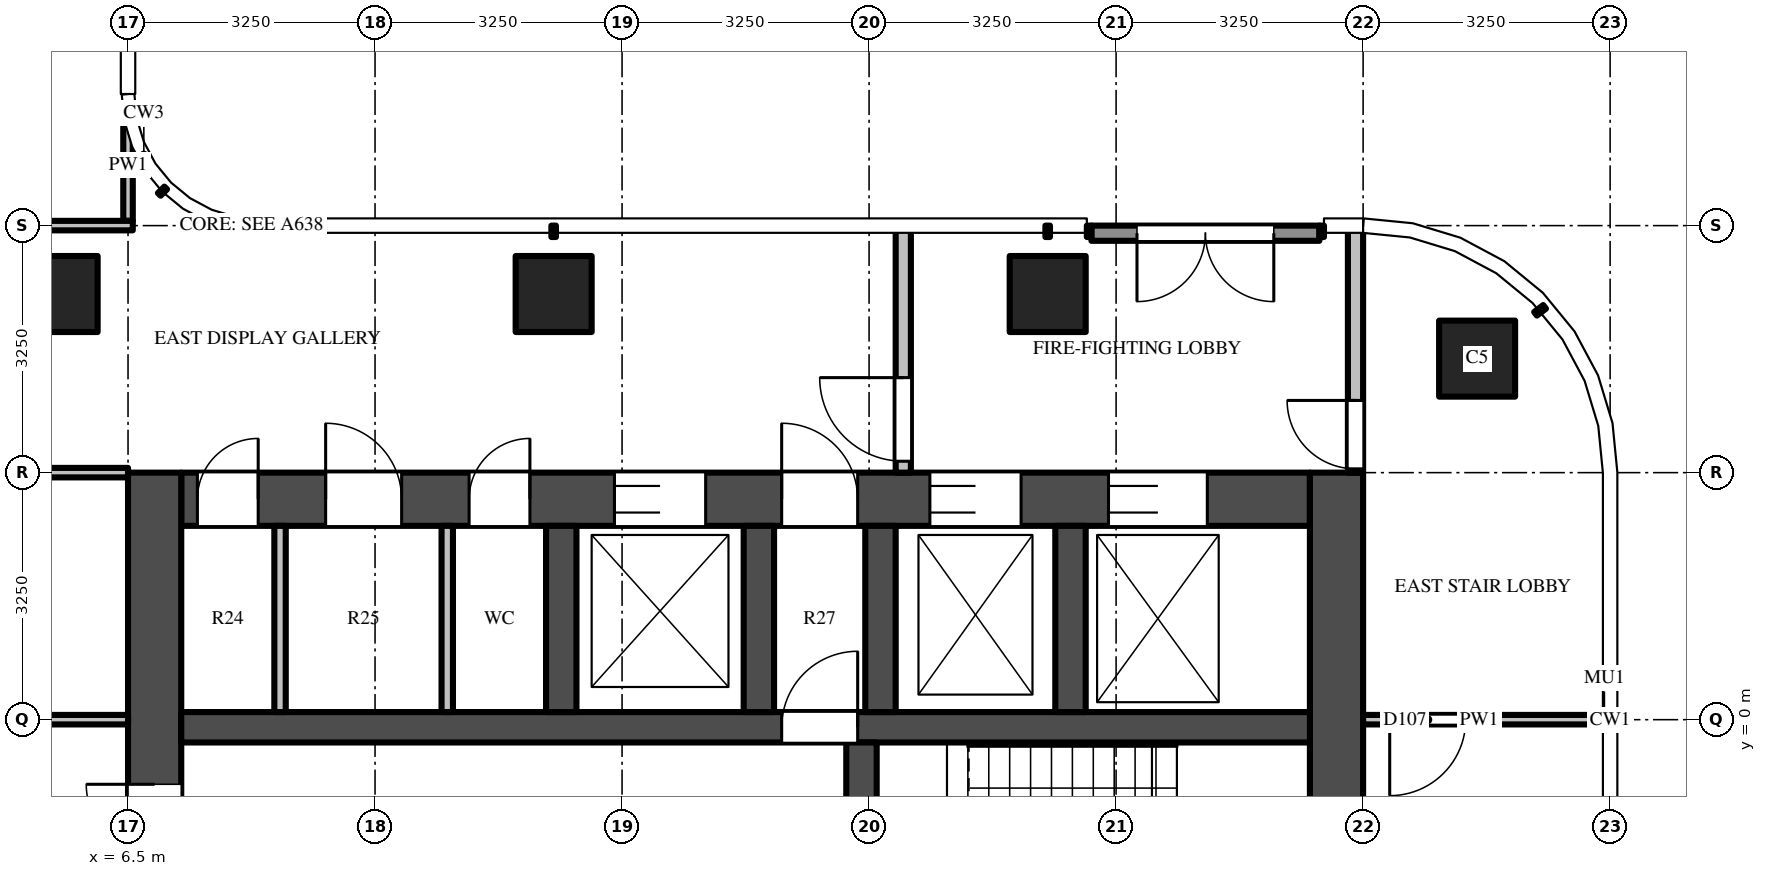
"""IFC4 building model, lengths in metres.
Left out: names, types, materials, properties, quantities, classifications, styles, units other than length and angle.
Written with IfcOpenShell. Run it as: python <this file> out.ifc"""

import sys

from ifc_helpers import new_model, si_unit, direction, frame, frame_2d, origin, origin_2d, place, context, subcontext, project, spatial, rectangle, extrude, source, transform, mapped, element, fill, save


model = new_model("IFC4")
c1 = context("Model", 3, precision=1e-05, world=origin(), true_north=direction((0.0, 1.0)))
c2 = subcontext(c1, "Body", "Model", "MODEL_VIEW")
j1 = project(units=[si_unit("LENGTHUNIT", "METRE"), si_unit("PLANEANGLEUNIT", "RADIAN")], contexts=[c1])
p1 = place(None, origin())
s1 = spatial("IfcSite", under=j1, at=p1, CompositionType="ELEMENT")
p2 = place(p1, origin())
s2 = spatial("IfcBuilding", under=s1, at=p2, CompositionType="ELEMENT")
p3 = place(p2, frame((0.0, 0.0, 295.0)))
s3 = spatial("IfcBuildingStorey", under=s2, at=p3, CompositionType="ELEMENT", Elevation=295.0)
m1 = source(origin(), c2, "Body", "SweptSolid", [
    extrude(rectangle(XDim=1.0, YDim=1.0, at=origin_2d()), origin(), (0.0, 0.0, 1.0), 3.9),
])
for number, where, z_axis, x_axis in (
    (1, (12.1, 5.6, 0.0), (0.0, 0.0, 1.0), (1.0, 0.0, 0.0)),
    (2, (18.6, 5.6, 0.0), (0.0, 0.0, 1.0), (1.0, 0.0, 0.0)),
    (3, (24.25, 4.75, 0.0), (0.0, 0.0, 1.0), (1.0, 0.0, 0.0)),
    (4, (5.6, 5.6, 0.0), (0.0, 0.0, 1.0), (1.0, 0.0, 0.0)),
):
    element("IfcColumn", number, at=place(p3, frame(where, z_axis=z_axis, x_axis=x_axis)), inside=s3, PredefinedType="COLUMN", context=c2, shape_type="MappedRepresentation", body=[
        mapped(m1, transform((0.0, 0.0, 0.0))),
    ])
m2 = source(origin(), c2, "Body", "SweptSolid", [
    extrude(rectangle(XDim=14.85, YDim=0.7, at=frame_2d((7.425, 0.0))), origin(), (0.0, 0.0, 1.0), 3.7),
])
p4 = place(p3, frame((7.2, 2.9, 0.0), z_axis=(0.0, 0.0, 1.0), x_axis=(1.0, 0.0, 0.0)))
e5 = element("IfcWall", 5, at=p4, inside=s3, PredefinedType="SHEAR", context=c2, shape_type="MappedRepresentation", body=[
    mapped(m2, transform((0.0, 0.0, 0.0))),
])
m3 = source(origin(), c2, "Body", "SweptSolid", [
    extrude(rectangle(XDim=1.2, YDim=2.1, at=frame_2d((0.6, 1.05))), frame((0.0, 0.36, 0.0), z_axis=(0.0, -1.0, 0.0), x_axis=(1.0, 0.0, 0.0)), (0.0, 0.0, 1.0), 0.72),
])
p5 = place(p4, frame((5.7, 0.0, 0.0)))
e6 = element("IfcOpeningElement", 6, at=p5, cuts=e5, PredefinedType="OPENING", context=c2, shape_type="MappedRepresentation", body=[
    mapped(m3, transform((0.0, 0.0, 0.0))),
])
m4 = source(origin(), c2, "Body", "SweptSolid", [
    extrude(rectangle(XDim=1.3, YDim=2.1, at=frame_2d((0.65, 1.05))), frame((0.0, 0.36, 0.0), z_axis=(0.0, -1.0, 0.0), x_axis=(1.0, 0.0, 0.0)), (0.0, 0.0, 1.0), 0.72),
])
p6 = place(p4, frame((12.2, 0.0, 0.0)))
e7 = element("IfcOpeningElement", 7, at=p6, cuts=e5, PredefinedType="OPENING", context=c2, shape_type="MappedRepresentation", body=[
    mapped(m4, transform((0.0, 0.0, 0.0))),
])
p7 = place(p4, frame((9.85, 0.0, 0.0)))
e8 = element("IfcOpeningElement", 8, at=p7, cuts=e5, PredefinedType="OPENING", context=c2, shape_type="MappedRepresentation", body=[
    mapped(m3, transform((0.0, 0.0, 0.0))),
])
m5 = source(origin(), c2, "Body", "SweptSolid", [
    extrude(rectangle(XDim=1.0, YDim=2.1, at=frame_2d((0.5, 1.05))), frame((0.0, 0.36, 0.0), z_axis=(0.0, -1.0, 0.0), x_axis=(1.0, 0.0, 0.0)), (0.0, 0.0, 1.0), 0.72),
])
p8 = place(p4, frame((7.9, 0.0, 0.0)))
e9 = element("IfcOpeningElement", 9, at=p8, cuts=e5, PredefinedType="OPENING", context=c2, shape_type="MappedRepresentation", body=[
    mapped(m5, transform((0.0, 0.0, 0.0))),
])
m6 = source(origin(), c2, "Body", "SweptSolid", [
    extrude(rectangle(XDim=0.8, YDim=2.1, at=frame_2d((0.4, 1.05))), frame((0.0, 0.36, 0.0), z_axis=(0.0, -1.0, 0.0), x_axis=(1.0, 0.0, 0.0)), (0.0, 0.0, 1.0), 0.72),
])
p9 = place(p4, frame((0.212, 0.0, 0.0)))
e10 = element("IfcOpeningElement", 10, at=p9, cuts=e5, PredefinedType="OPENING", context=c2, shape_type="MappedRepresentation", body=[
    mapped(m6, transform((0.0, 0.0, 0.0))),
])
p10 = place(p4, frame((1.9, 0.0, 0.0)))
e11 = element("IfcOpeningElement", 11, at=p10, cuts=e5, PredefinedType="OPENING", context=c2, shape_type="MappedRepresentation", body=[
    mapped(m5, transform((0.0, 0.0, 0.0))),
])
p11 = place(p4, frame((3.788, 0.0, 0.0)))
e12 = element("IfcOpeningElement", 12, at=p11, cuts=e5, PredefinedType="OPENING", context=c2, shape_type="MappedRepresentation", body=[
    mapped(m6, transform((0.0, 0.0, 0.0))),
])
m7 = source(origin(), c2, "Body", "SweptSolid", [
    extrude(rectangle(XDim=9.05, YDim=0.7, at=frame_2d((4.525, 0.0))), origin(), (0.0, 0.0, 1.0), 3.7),
])
p12 = place(p3, frame((6.85, -5.8, 0.0), z_axis=(0.0, 0.0, 1.0), x_axis=(0.0, 1.0, 0.0)))
e13 = element("IfcWall", 13, at=p12, inside=s3, PredefinedType="SHEAR", context=c2, shape_type="MappedRepresentation", body=[
    mapped(m7, transform((0.0, 0.0, 0.0))),
])
m8 = source(origin(), c2, "Body", "SweptSolid", [
    extrude(rectangle(XDim=1.8, YDim=2.1, at=frame_2d((0.9, 1.05))), frame((0.0, 0.36, 0.0), z_axis=(0.0, -1.0, 0.0), x_axis=(1.0, 0.0, 0.0)), (0.0, 0.0, 1.0), 0.72),
])
p13 = place(p12, frame((3.15, 0.0, 0.0)))
e14 = element("IfcOpeningElement", 14, at=p13, cuts=e13, PredefinedType="OPENING", context=c2, shape_type="MappedRepresentation", body=[
    mapped(m8, transform((0.0, 0.0, 0.0))),
])
p14 = place(p3, frame((22.4, -5.8, 0.0), z_axis=(0.0, 0.0, 1.0), x_axis=(0.0, 1.0, 0.0)))
e15 = element("IfcWall", 15, at=p14, inside=s3, PredefinedType="SHEAR", context=c2, shape_type="MappedRepresentation", body=[
    mapped(m7, transform((0.0, 0.0, 0.0))),
])
m9 = source(origin(), c2, "Body", "SweptSolid", [
    extrude(rectangle(XDim=14.85, YDim=0.4, at=frame_2d((7.425, 0.0))), origin(), (0.0, 0.0, 1.0), 3.7),
])
p15 = place(p3, frame((7.2, -0.1, 0.0), z_axis=(0.0, 0.0, 1.0), x_axis=(1.0, 0.0, 0.0)))
e16 = element("IfcWall", 16, at=p15, inside=s3, PredefinedType="SHEAR", context=c2, shape_type="MappedRepresentation", body=[
    mapped(m9, transform((0.0, 0.0, 0.0))),
])
m10 = source(origin(), c2, "Body", "SweptSolid", [
    extrude(rectangle(XDim=1.0, YDim=2.1, at=frame_2d((0.5, 1.05))), frame((0.0, 0.21, 0.0), z_axis=(0.0, -1.0, 0.0), x_axis=(1.0, 0.0, 0.0)), (0.0, 0.0, 1.0), 0.42),
])
p16 = place(p15, frame((7.9, 0.0, 0.0)))
e17 = element("IfcOpeningElement", 17, at=p16, cuts=e16, PredefinedType="OPENING", context=c2, shape_type="MappedRepresentation", body=[
    mapped(m10, transform((0.0, 0.0, 0.0))),
])
m11 = source(origin(), c2, "Body", "SweptSolid", [
    extrude(rectangle(XDim=5.5, YDim=0.4, at=frame_2d((2.75, 0.0))), origin(), (0.0, 0.0, 1.0), 3.7),
])
p17 = place(p3, frame((16.15, -5.8, 0.0), z_axis=(0.0, 0.0, 1.0), x_axis=(0.0, 1.0, 0.0)))
e18 = element("IfcWall", 18, at=p17, inside=s3, PredefinedType="SHEAR", context=c2, shape_type="MappedRepresentation", body=[
    mapped(m11, transform((0.0, 0.0, 0.0))),
])
m12 = source(origin(), c2, "Body", "SweptSolid", [
    extrude(rectangle(XDim=1.1, YDim=2.1, at=frame_2d((0.55, 1.05))), frame((0.0, 0.21, 0.0), z_axis=(0.0, -1.0, 0.0), x_axis=(1.0, 0.0, 0.0)), (0.0, 0.0, 1.0), 0.42),
])
p18 = place(p17, frame((0.725, 0.0, 0.0)))
e19 = element("IfcOpeningElement", 19, at=p18, cuts=e18, PredefinedType="OPENING", context=c2, shape_type="MappedRepresentation", body=[
    mapped(m12, transform((0.0, 0.0, 0.0))),
])
p19 = place(p17, frame((3.675, 0.0, 0.0)))
e20 = element("IfcOpeningElement", 20, at=p19, cuts=e18, PredefinedType="OPENING", context=c2, shape_type="MappedRepresentation", body=[
    mapped(m12, transform((0.0, 0.0, 0.0))),
])
m13 = source(origin(), c2, "Body", "SweptSolid", [
    extrude(rectangle(XDim=2.45, YDim=0.4, at=frame_2d((1.225, 0.0))), origin(), (0.0, 0.0, 1.0), 3.7),
])
for number, where, z_axis, x_axis in (
    (21, (12.2, 0.1, 0.0), (0.0, 0.0, 1.0), (0.0, 1.0, 0.0)),
    (22, (14.8, 0.1, 0.0), (0.0, 0.0, 1.0), (0.0, 1.0, 0.0)),
    (23, (16.4, 0.1, 0.0), (0.0, 0.0, 1.0), (0.0, 1.0, 0.0)),
    (24, (18.9, 0.1, 0.0), (0.0, 0.0, 1.0), (0.0, 1.0, 0.0)),
):
    element("IfcWall", number, at=place(p3, frame(where, z_axis=z_axis, x_axis=x_axis)), inside=s3, PredefinedType="SHEAR", context=c2, shape_type="MappedRepresentation", body=[
        mapped(m13, transform((0.0, 0.0, 0.0))),
    ])
m14 = source(origin(), c2, "Body", "SweptSolid", [
    extrude(rectangle(XDim=3.25, YDim=0.2, at=frame_2d((1.625, 0.0))), origin(), (0.0, 0.0, 1.0), 3.7),
])
p20 = place(p3, frame((16.7, 3.25, 0.0), z_axis=(0.0, 0.0, 1.0), x_axis=(0.0, 1.0, 0.0)))
e25 = element("IfcWall", 25, at=p20, inside=s3, PredefinedType="PARTITIONING", context=c2, shape_type="MappedRepresentation", body=[
    mapped(m14, transform((0.0, 0.0, 0.0))),
])
m15 = source(origin(), c2, "Body", "SweptSolid", [
    extrude(rectangle(XDim=1.1, YDim=2.1, at=frame_2d((0.55, 1.05))), frame((0.0, 0.11, 0.0), z_axis=(0.0, -1.0, 0.0), x_axis=(1.0, 0.0, 0.0)), (0.0, 0.0, 1.0), 0.22),
])
p21 = place(p20, frame((0.15, 0.0, 0.0)))
e26 = element("IfcOpeningElement", 26, at=p21, cuts=e25, PredefinedType="OPENING", context=c2, shape_type="MappedRepresentation", body=[
    mapped(m15, transform((0.0, 0.0, 0.0))),
])
p22 = place(p3, frame((22.65, 3.25, 0.0), z_axis=(0.0, 0.0, 1.0), x_axis=(0.0, 1.0, 0.0)))
e27 = element("IfcWall", 27, at=p22, inside=s3, PredefinedType="PARTITIONING", context=c2, shape_type="MappedRepresentation", body=[
    mapped(m14, transform((0.0, 0.0, 0.0))),
])
m16 = source(origin(), c2, "Body", "SweptSolid", [
    extrude(rectangle(XDim=0.9, YDim=2.1, at=frame_2d((0.45, 1.05))), frame((0.0, 0.11, 0.0), z_axis=(0.0, -1.0, 0.0), x_axis=(1.0, 0.0, 0.0)), (0.0, 0.0, 1.0), 0.22),
])
p23 = place(p22, frame((0.05, 0.0, 0.0)))
e28 = element("IfcOpeningElement", 28, at=p23, cuts=e27, PredefinedType="OPENING", context=c2, shape_type="MappedRepresentation", body=[
    mapped(m16, transform((0.0, 0.0, 0.0))),
])
m17 = source(origin(), c2, "Body", "SweptSolid", [
    extrude(rectangle(XDim=2.45, YDim=0.15, at=frame_2d((1.225, 0.0))), origin(), (0.0, 0.0, 1.0), 3.7),
])
for number, where, z_axis, x_axis in (
    (29, (8.5, 0.1, 0.0), (0.0, 0.0, 1.0), (0.0, 1.0, 0.0)),
    (30, (10.7, 0.1, 0.0), (0.0, 0.0, 1.0), (0.0, 1.0, 0.0)),
):
    element("IfcWall", number, at=place(p3, frame(where, z_axis=z_axis, x_axis=x_axis)), inside=s3, PredefinedType="PARTITIONING", context=c2, shape_type="MappedRepresentation", body=[
        mapped(m17, transform((0.0, 0.0, 0.0))),
    ])
m18 = source(origin(), c2, "Body", "SweptSolid", [
    extrude(rectangle(XDim=3.0, YDim=0.2, at=frame_2d((1.5, 0.0))), origin(), (0.0, 0.0, 1.0), 3.7),
])
p24 = place(p3, frame((22.175, 6.4, 0.0), z_axis=(0.0, 0.0, 1.0), x_axis=(-1.0, 0.0, 0.0)))
e31 = element("IfcWall", 31, at=p24, inside=s3, PredefinedType="SOLIDWALL", context=c2, shape_type="MappedRepresentation", body=[
    mapped(m18, transform((0.0, 0.0, 0.0))),
])
m19 = source(origin(), c2, "Body", "SweptSolid", [
    extrude(rectangle(XDim=1.8, YDim=2.4, at=frame_2d((0.9, 1.2))), frame((0.0, 0.11, 0.0), z_axis=(0.0, -1.0, 0.0), x_axis=(1.0, 0.0, 0.0)), (0.0, 0.0, 1.0), 0.22),
])
p25 = place(p24, frame((0.6, 0.0, 0.0)))
e32 = element("IfcOpeningElement", 32, at=p25, cuts=e31, PredefinedType="OPENING", context=c2, shape_type="MappedRepresentation", body=[
    mapped(m19, transform((0.0, 0.0, 0.0))),
])
m20 = source(origin(), c2, "Body", "SweptSolid", [
    extrude(rectangle(XDim=1.469, YDim=0.125, at=frame_2d((0.734, 0.0))), origin(), (0.0, 0.0, 1.0), 3.7),
])
p26 = place(p3, frame((6.5, 6.562, 0.0), z_axis=(0.0, 0.0, 1.0), x_axis=(0.0, 1.0, 0.0)))
e33 = element("IfcWall", 33, at=p26, inside=s3, PredefinedType="PARTITIONING", context=c2, shape_type="MappedRepresentation", body=[
    mapped(m20, transform((0.0, 0.0, 0.0))),
])
m21 = source(origin(), c2, "Body", "SweptSolid", [
    extrude(rectangle(XDim=5.363, YDim=0.125, at=frame_2d((2.681, 0.0))), origin(), (0.0, 0.0, 1.0), 2.997),
])
p27 = place(p3, frame((6.5, 0.0, 0.0), z_axis=(0.0, 0.0, 1.0), x_axis=(-1.0, 0.0, 0.0)))
e34 = element("IfcWall", 34, at=p27, inside=s3, PredefinedType="PARTITIONING", context=c2, shape_type="MappedRepresentation", body=[
    mapped(m21, transform((0.0, 0.0, 0.0))),
])
m22 = source(origin(), c2, "Body", "SweptSolid", [
    extrude(rectangle(XDim=1.0, YDim=2.1, at=frame_2d((0.5, 1.05))), frame((0.0, 0.073, 0.0), z_axis=(0.0, -1.0, 0.0), x_axis=(1.0, 0.0, 0.0)), (0.0, 0.0, 1.0), 0.145),
])
p28 = place(p27, frame((3.95, 0.0, 0.0)))
e35 = element("IfcOpeningElement", 35, at=p28, cuts=e34, PredefinedType="OPENING", context=c2, shape_type="MappedRepresentation", body=[
    mapped(m22, transform((0.0, 0.0, 0.0))),
])
m23 = source(origin(), c2, "Body", "SweptSolid", [
    extrude(rectangle(XDim=3.05, YDim=0.125, at=frame_2d((1.525, 0.0))), origin(), (0.0, 0.0, 1.0), 2.78),
])
p29 = place(p3, frame((25.8, 0.0, 0.0), z_axis=(0.0, 0.0, 1.0), x_axis=(-1.0, 0.0, 0.0)))
e36 = element("IfcWall", 36, at=p29, inside=s3, PredefinedType="PARTITIONING", context=c2, shape_type="MappedRepresentation", body=[
    mapped(m23, transform((0.0, 0.0, 0.0))),
])
p30 = place(p29, frame((1.7, 0.0, 0.0)))
e37 = element("IfcOpeningElement", 37, at=p30, cuts=e36, PredefinedType="OPENING", context=c2, shape_type="MappedRepresentation", body=[
    mapped(m22, transform((0.0, 0.0, 0.0))),
])
p31 = place(p3, frame((1.137, 3.25, 0.0), z_axis=(0.0, 0.0, 1.0), x_axis=(1.0, 0.0, 0.0)))
e38 = element("IfcWall", 38, at=p31, inside=s3, PredefinedType="PARTITIONING", context=c2, shape_type="MappedRepresentation", body=[
    mapped(m21, transform((0.0, 0.0, 0.0))),
])
m24 = source(origin(), c2, "Body", "SweptSolid", [
    extrude(rectangle(XDim=5.425, YDim=0.125, at=frame_2d((2.712, 0.0))), origin(), (0.0, 0.0, 1.0), 2.78),
])
p32 = place(p3, frame((1.137, 6.5, 0.0), z_axis=(0.0, 0.0, 1.0), x_axis=(1.0, 0.0, 0.0)))
e39 = element("IfcWall", 39, at=p32, inside=s3, PredefinedType="PARTITIONING", context=c2, shape_type="MappedRepresentation", body=[
    mapped(m24, transform((0.0, 0.0, 0.0))),
])
m25 = source(origin(), c2, "Body", "SweptSolid", [
    extrude(rectangle(XDim=1.2, YDim=2.1, at=frame_2d((0.6, 1.05))), frame((0.0, -0.275, 0.0), z_axis=(0.0, -1.0, 0.0), x_axis=(1.0, 0.0, 0.0)), (0.0, 0.0, 1.0), 0.05),
])
p33 = place(p5, origin())
e40 = element("IfcDoor", 40, at=p33, inside=s3, OperationType="DOUBLE_DOOR_SLIDING", PredefinedType="DOOR", context=c2, shape_type="MappedRepresentation", body=[
    mapped(m25, transform((0.0, 0.0, 0.0))),
])
fill(e6, e40)
m26 = source(origin(), c2, "Body", "SweptSolid", [
    extrude(rectangle(XDim=1.3, YDim=2.1, at=frame_2d((0.65, 1.05))), frame((0.0, -0.275, 0.0), z_axis=(0.0, -1.0, 0.0), x_axis=(1.0, 0.0, 0.0)), (0.0, 0.0, 1.0), 0.05),
])
p34 = place(p6, origin())
e41 = element("IfcDoor", 41, at=p34, inside=s3, OperationType="DOUBLE_DOOR_SLIDING", PredefinedType="DOOR", context=c2, shape_type="MappedRepresentation", body=[
    mapped(m26, transform((0.0, 0.0, 0.0))),
])
fill(e7, e41)
p35 = place(p7, origin())
e42 = element("IfcDoor", 42, at=p35, inside=s3, OperationType="DOUBLE_DOOR_SLIDING", PredefinedType="DOOR", context=c2, shape_type="MappedRepresentation", body=[
    mapped(m25, transform((0.0, 0.0, 0.0))),
])
fill(e8, e42)
m27 = source(origin(), c2, "Body", "SweptSolid", [
    extrude(rectangle(XDim=1.8, YDim=2.1, at=frame_2d((0.9, 1.05))), frame((0.0, -0.275, 0.0), z_axis=(0.0, -1.0, 0.0), x_axis=(1.0, 0.0, 0.0)), (0.0, 0.0, 1.0), 0.05),
])
p36 = place(p13, origin())
e43 = element("IfcDoor", 43, at=p36, inside=s3, OperationType="DOUBLE_DOOR_SINGLE_SWING", PredefinedType="DOOR", context=c2, shape_type="MappedRepresentation", body=[
    mapped(m27, transform((0.0, 0.0, 0.0))),
])
fill(e14, e43)
m28 = source(origin(), c2, "Body", "SweptSolid", [
    extrude(rectangle(XDim=1.0, YDim=2.1, at=frame_2d((0.5, 1.05))), frame((0.0, 0.025, 0.0), z_axis=(0.0, -1.0, 0.0), x_axis=(1.0, 0.0, 0.0)), (0.0, 0.0, 1.0), 0.05),
])
p37 = place(p16, origin())
e44 = element("IfcDoor", 44, at=p37, inside=s3, OperationType="SINGLE_SWING_RIGHT", PredefinedType="DOOR", context=c2, shape_type="MappedRepresentation", body=[
    mapped(m28, transform((0.0, 0.0, 0.0))),
])
fill(e17, e44)
m29 = source(origin(), c2, "Body", "SweptSolid", [
    extrude(rectangle(XDim=1.0, YDim=2.1, at=frame_2d((0.5, 1.05))), frame((0.0, -0.275, 0.0), z_axis=(0.0, -1.0, 0.0), x_axis=(1.0, 0.0, 0.0)), (0.0, 0.0, 1.0), 0.05),
])
p38 = place(p8, origin())
e45 = element("IfcDoor", 45, at=p38, inside=s3, OperationType="SINGLE_SWING_LEFT", PredefinedType="DOOR", context=c2, shape_type="MappedRepresentation", body=[
    mapped(m29, transform((0.0, 0.0, 0.0))),
])
fill(e9, e45)
m30 = source(origin(), c2, "Body", "SweptSolid", [
    extrude(rectangle(XDim=1.1, YDim=2.1, at=frame_2d((0.55, 1.05))), frame((0.0, 0.025, 0.0), z_axis=(0.0, -1.0, 0.0), x_axis=(1.0, 0.0, 0.0)), (0.0, 0.0, 1.0), 0.05),
])
p39 = place(p21, origin())
e46 = element("IfcDoor", 46, at=p39, inside=s3, OperationType="SINGLE_SWING_RIGHT", PredefinedType="DOOR", context=c2, shape_type="MappedRepresentation", body=[
    mapped(m30, transform((0.0, 0.0, 0.0))),
])
fill(e26, e46)
m31 = source(origin(), c2, "Body", "SweptSolid", [
    extrude(rectangle(XDim=0.9, YDim=2.1, at=frame_2d((0.45, 1.05))), frame((0.0, 0.025, 0.0), z_axis=(0.0, -1.0, 0.0), x_axis=(1.0, 0.0, 0.0)), (0.0, 0.0, 1.0), 0.05),
])
p40 = place(p23, origin())
e47 = element("IfcDoor", 47, at=p40, inside=s3, OperationType="SINGLE_SWING_RIGHT", PredefinedType="DOOR", context=c2, shape_type="MappedRepresentation", body=[
    mapped(m31, transform((0.0, 0.0, 0.0))),
])
fill(e28, e47)
m32 = source(origin(), c2, "Body", "SweptSolid", [
    extrude(rectangle(XDim=0.8, YDim=2.1, at=frame_2d((0.4, 1.05))), frame((0.0, -0.275, 0.0), z_axis=(0.0, -1.0, 0.0), x_axis=(1.0, 0.0, 0.0)), (0.0, 0.0, 1.0), 0.05),
])
p41 = place(p9, origin())
e48 = element("IfcDoor", 48, at=p41, inside=s3, OperationType="SINGLE_SWING_RIGHT", PredefinedType="DOOR", context=c2, shape_type="MappedRepresentation", body=[
    mapped(m32, transform((0.0, 0.0, 0.0))),
])
fill(e10, e48)
p42 = place(p10, origin())
e49 = element("IfcDoor", 49, at=p42, inside=s3, OperationType="SINGLE_SWING_LEFT", PredefinedType="DOOR", context=c2, shape_type="MappedRepresentation", body=[
    mapped(m29, transform((0.0, 0.0, 0.0))),
])
fill(e11, e49)
p43 = place(p11, origin())
e50 = element("IfcDoor", 50, at=p43, inside=s3, OperationType="SINGLE_SWING_RIGHT", PredefinedType="DOOR", context=c2, shape_type="MappedRepresentation", body=[
    mapped(m32, transform((0.0, 0.0, 0.0))),
])
fill(e12, e50)
m33 = source(origin(), c2, "Body", "SweptSolid", [
    extrude(rectangle(XDim=1.8, YDim=2.4, at=frame_2d((0.9, 1.2))), frame((0.0, 0.025, 0.0), z_axis=(0.0, -1.0, 0.0), x_axis=(1.0, 0.0, 0.0)), (0.0, 0.0, 1.0), 0.05),
])
p44 = place(p25, origin())
e51 = element("IfcDoor", 51, at=p44, inside=s3, OperationType="DOUBLE_DOOR_SINGLE_SWING", PredefinedType="DOOR", context=c2, shape_type="MappedRepresentation", body=[
    mapped(m33, transform((0.0, 0.0, 0.0))),
])
fill(e32, e51)
p45 = place(p30, origin())
e52 = element("IfcDoor", 52, at=p45, inside=s3, OperationType="SINGLE_SWING_RIGHT", PredefinedType="DOOR", context=c2, shape_type="MappedRepresentation", body=[
    mapped(m28, transform((0.0, 0.0, 0.0))),
])
fill(e37, e52)
save(model, sys.argv[1])
